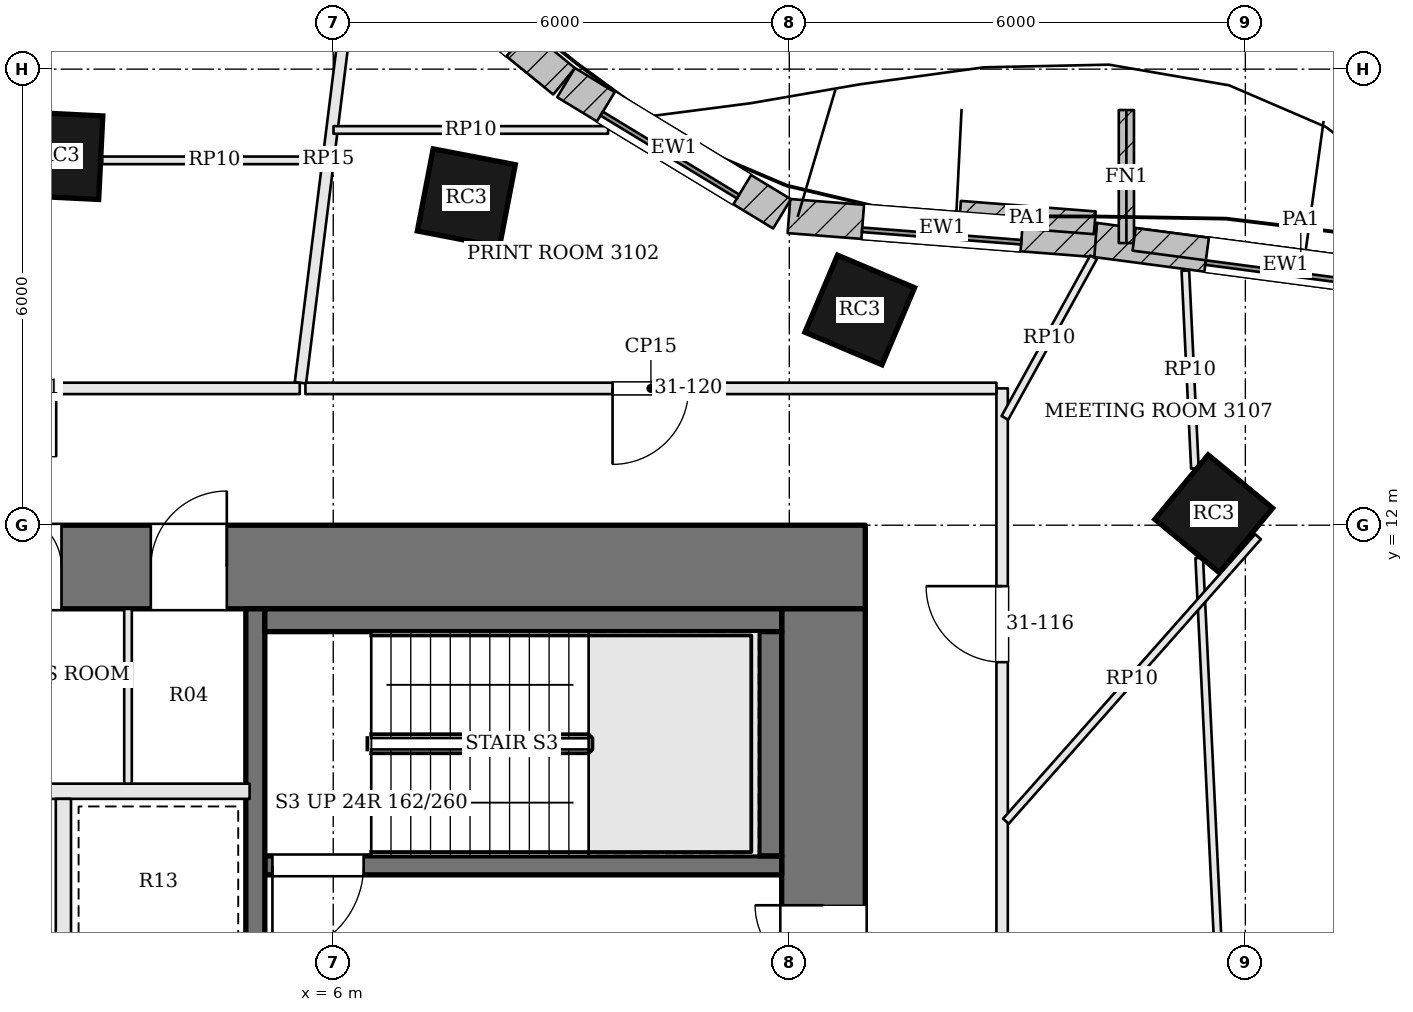
"""IFC4 building model, lengths in metres.
Left out: names, types, materials, properties, quantities, classifications, styles, units other than length and angle.
Written with IfcOpenShell. Run it as: python <this file> out.ifc"""

import sys

from ifc_helpers import new_model, si_unit, direction, frame, frame_2d, origin, origin_2d, place, context, subcontext, project, spatial, rectangle, extrude, element, fill, save


model = new_model("IFC4")
c1 = context("Model", 3, precision=1e-05, world=origin(), true_north=direction((0.0, 1.0)))
c2 = subcontext(c1, "Body", "Model", "MODEL_VIEW")
j1 = project(units=[si_unit("LENGTHUNIT", "METRE"), si_unit("PLANEANGLEUNIT", "RADIAN")], contexts=[c1])
p1 = place(None, origin())
s1 = spatial("IfcSite", under=j1, at=p1, CompositionType="ELEMENT")
p2 = place(p1, origin())
s2 = spatial("IfcBuilding", under=s1, at=p2, CompositionType="ELEMENT")
p3 = place(p2, frame((0.0, 0.0, 130.5)))
s3 = spatial("IfcBuildingStorey", under=s2, at=p3, CompositionType="ELEMENT", Elevation=130.5)
p4 = place(p3, frame((-13.0, 11.45, 0.0), z_axis=(0.0, 0.0, 1.0), x_axis=(1.0, 0.0, 0.0)))
e1 = element("IfcWall", 1, at=p4, inside=s3, PredefinedType="SHEAR", context=c2, shape_type="SweptSolid", body=[
    extrude(rectangle(XDim=26.0, YDim=1.1, at=frame_2d((13.0, 0.0))), origin(), (0.0, 0.0, 1.0), 3.9),
])
p5 = place(p4, frame((9.65, 0.0, 0.0)))
e2 = element("IfcOpeningElement", 2, at=p5, cuts=e1, PredefinedType="OPENING", context=c2, shape_type="SweptSolid", body=[
    extrude(rectangle(XDim=1.0, YDim=2.1, at=frame_2d((0.5, 1.05))), frame((0.0, 0.56, 0.0), z_axis=(0.0, -1.0, 0.0), x_axis=(1.0, 0.0, 0.0)), (0.0, 0.0, 1.0), 1.12),
])
p6 = place(p4, frame((12.675, 0.0, 0.0)))
e3 = element("IfcOpeningElement", 3, at=p6, cuts=e1, PredefinedType="OPENING", context=c2, shape_type="SweptSolid", body=[
    extrude(rectangle(XDim=0.7, YDim=2.1, at=frame_2d((0.35, 1.05))), frame((0.0, 0.56, 0.0), z_axis=(0.0, -1.0, 0.0), x_axis=(1.0, 0.0, 0.0)), (0.0, 0.0, 1.0), 1.12),
])
p7 = place(p4, frame((14.725, 0.0, 0.0)))
e4 = element("IfcOpeningElement", 4, at=p7, cuts=e1, PredefinedType="OPENING", context=c2, shape_type="SweptSolid", body=[
    extrude(rectangle(XDim=0.7, YDim=2.1, at=frame_2d((0.35, 1.05))), frame((0.0, 0.56, 0.0), z_axis=(0.0, -1.0, 0.0), x_axis=(1.0, 0.0, 0.0)), (0.0, 0.0, 1.0), 1.12),
])
p8 = place(p4, frame((16.6, 0.0, 0.0)))
e5 = element("IfcOpeningElement", 5, at=p8, cuts=e1, PredefinedType="OPENING", context=c2, shape_type="SweptSolid", body=[
    extrude(rectangle(XDim=1.0, YDim=2.1, at=frame_2d((0.5, 1.05))), frame((0.0, 0.56, 0.0), z_axis=(0.0, -1.0, 0.0), x_axis=(1.0, 0.0, 0.0)), (0.0, 0.0, 1.0), 1.12),
])
p9 = place(p3, frame((12.45, -1.9, 0.0), z_axis=(0.0, 0.0, 1.0), x_axis=(0.0, 1.0, 0.0)))
e6 = element("IfcWall", 6, at=p9, inside=s3, PredefinedType="SHEAR", context=c2, shape_type="SweptSolid", body=[
    extrude(rectangle(XDim=12.8, YDim=1.1, at=frame_2d((6.4, 0.0))), origin(), (0.0, 0.0, 1.0), 3.9),
])
p10 = place(p9, frame((7.1, 0.0, 0.0)))
e7 = element("IfcOpeningElement", 7, at=p10, cuts=e6, PredefinedType="OPENING", context=c2, shape_type="SweptSolid", body=[
    extrude(rectangle(XDim=1.8, YDim=2.1, at=frame_2d((0.9, 1.05))), frame((0.0, 0.56, 0.0), z_axis=(0.0, -1.0, 0.0), x_axis=(1.0, 0.0, 0.0)), (0.0, 0.0, 1.0), 1.12),
])
for number, where, z_axis, x_axis in (
    (8, (17.584, 12.151, 0.0), (0.0, 0.0, 1.0), (-0.771, 0.637, 0.0)),
    (9, (12.927, 14.832, 0.0), (0.0, 0.0, 1.0), (-0.921, 0.389, 0.0)),
    (10, (7.751, 16.307, 0.0), (0.0, 0.0, 1.0), (-0.982, 0.189, 0.0)),
    (11, (2.392, 16.862, 0.0), (0.0, 0.0, 1.0), (-0.999, 0.049, 0.0)),
):
    element("IfcColumn", number, at=place(p3, frame(where, z_axis=z_axis, x_axis=x_axis)), inside=s3, PredefinedType="COLUMN", context=c2, shape_type="SweptSolid", body=[
        extrude(rectangle(XDim=1.1, YDim=1.1, at=origin_2d()), origin(), (0.0, 0.0, 1.0), 3.9),
    ])
p11 = place(p3, frame((21.044, 15.091, 0.0), z_axis=(0.0, 0.0, 1.0), x_axis=(-0.991409967396, 0.130790965086, 0.0)))
e12 = element("IfcWall", 12, at=p11, inside=s3, PredefinedType="SOLIDWALL", context=c2, shape_type="SweptSolid", body=[
    extrude(rectangle(XDim=5.068, YDim=0.45, at=frame_2d((2.534, 0.0))), origin(), (0.0, 0.0, 1.0), 3.7),
])
p12 = place(p11, frame((1.484, 0.0, 0.9)))
e13 = element("IfcOpeningElement", 13, at=p12, cuts=e12, PredefinedType="OPENING", context=c2, shape_type="SweptSolid", body=[
    extrude(rectangle(XDim=2.1, YDim=2.3, at=frame_2d((1.05, 1.15))), frame((0.0, 0.235, 0.0), z_axis=(0.0, -1.0, 0.0), x_axis=(1.0, 0.0, 0.0)), (0.0, 0.0, 1.0), 0.47),
])
p13 = place(p3, frame((16.03, 15.752, 0.0), z_axis=(0.0, 0.0, 1.0), x_axis=(-0.996967628157, 0.077817404267, 0.0)))
e14 = element("IfcWall", 14, at=p13, inside=s3, PredefinedType="SOLIDWALL", context=c2, shape_type="SweptSolid", body=[
    extrude(rectangle(XDim=4.047, YDim=0.45, at=frame_2d((2.023, 0.0))), origin(), (0.0, 0.0, 1.0), 3.7),
])
p14 = place(p13, frame((0.974, 0.0, 0.9)))
e15 = element("IfcOpeningElement", 15, at=p14, cuts=e14, PredefinedType="OPENING", context=c2, shape_type="SweptSolid", body=[
    extrude(rectangle(XDim=2.1, YDim=2.3, at=frame_2d((1.05, 1.15))), frame((0.0, 0.235, 0.0), z_axis=(0.0, -1.0, 0.0), x_axis=(1.0, 0.0, 0.0)), (0.0, 0.0, 1.0), 0.47),
])
p15 = place(p3, frame((11.905, 16.096, 0.0), z_axis=(0.0, 0.0, 1.0), x_axis=(-0.854609476155, 0.519271261738, 0.0)))
e16 = element("IfcWall", 16, at=p15, inside=s3, PredefinedType="SOLIDWALL", context=c2, shape_type="SweptSolid", body=[
    extrude(rectangle(XDim=3.325, YDim=0.45, at=frame_2d((1.663, 0.0))), origin(), (0.0, 0.0, 1.0), 3.7),
])
p16 = place(p15, frame((0.612, 0.0, 0.9)))
e17 = element("IfcOpeningElement", 17, at=p16, cuts=e16, PredefinedType="OPENING", context=c2, shape_type="SweptSolid", body=[
    extrude(rectangle(XDim=2.1, YDim=2.3, at=frame_2d((1.05, 1.15))), frame((0.0, 0.235, 0.0), z_axis=(0.0, -1.0, 0.0), x_axis=(1.0, 0.0, 0.0)), (0.0, 0.0, 1.0), 0.47),
])
p17 = place(p3, frame((9.037, 17.84, 0.0), z_axis=(0.0, 0.0, 1.0), x_axis=(-0.774810240287, 0.632193871804, 0.0)))
e18 = element("IfcWall", 18, at=p17, inside=s3, PredefinedType="SOLIDWALL", context=c2, shape_type="SweptSolid", body=[
    extrude(rectangle(XDim=3.389, YDim=0.45, at=frame_2d((1.695, 0.0))), origin(), (0.0, 0.0, 1.0), 3.7),
])
p18 = place(p17, frame((0.795, 0.0, 0.9)))
e19 = element("IfcOpeningElement", 19, at=p18, cuts=e18, PredefinedType="OPENING", context=c2, shape_type="SweptSolid", body=[
    extrude(rectangle(XDim=1.8, YDim=2.3, at=frame_2d((0.9, 1.15))), frame((0.0, 0.235, 0.0), z_axis=(0.0, -1.0, 0.0), x_axis=(1.0, 0.0, 0.0)), (0.0, 0.0, 1.0), 0.47),
])
p19 = place(p3, frame((16.435, 15.712, 0.0), z_axis=(0.0, 0.0, 1.0), x_axis=(-0.000279017846, 0.999999961075, 0.0)))
e20 = element("IfcWall", 20, at=p19, inside=s3, PredefinedType="SOLIDWALL", context=c2, shape_type="SweptSolid", body=[
    extrude(rectangle(XDim=1.75, YDim=0.2, at=frame_2d((0.875, 0.0))), origin(), (0.0, 0.0, 1.0), 3.7),
])
p20 = place(p3, frame((20.923, 15.182, 3.9), z_axis=(0.0, 0.0, 1.0), x_axis=(-0.991411041714, 0.130782821377, 0.0)))
e21 = element("IfcWall", 21, at=p20, inside=s3, PredefinedType="PARAPET", context=c2, shape_type="SweptSolid", body=[
    extrude(rectangle(XDim=4.424, YDim=0.3, at=frame_2d((2.212, 0.0))), origin(), (0.0, 0.0, 1.0), 1.1),
])
p21 = place(p3, frame((16.019, 15.979, 3.9), z_axis=(0.0, 0.0, 1.0), x_axis=(-0.99696580474, 0.077840761676, 0.0)))
e22 = element("IfcWall", 22, at=p21, inside=s3, PredefinedType="PARAPET", context=c2, shape_type="SweptSolid", body=[
    extrude(rectangle(XDim=1.778, YDim=0.3, at=frame_2d((0.889, 0.0))), origin(), (0.0, 0.0, 1.0), 1.1),
])
p22 = place(p3, frame((11.9, 7.525, 0.0), z_axis=(0.0, 0.0, 1.0), x_axis=(-1.0, 0.0, 0.0)))
e23 = element("IfcWall", 23, at=p22, inside=s3, PredefinedType="SOLIDWALL", context=c2, shape_type="SweptSolid", body=[
    extrude(rectangle(XDim=6.8, YDim=0.25, at=frame_2d((3.4, 0.0))), origin(), (0.0, 0.0, 1.0), 3.7),
])
p23 = place(p22, frame((5.5, 0.0, 0.0)))
e24 = element("IfcOpeningElement", 24, at=p23, cuts=e23, PredefinedType="OPENING", context=c2, shape_type="SweptSolid", body=[
    extrude(rectangle(XDim=1.2, YDim=2.1, at=frame_2d((0.6, 1.05))), frame((0.0, 0.135, 0.0), z_axis=(0.0, -1.0, 0.0), x_axis=(1.0, 0.0, 0.0)), (0.0, 0.0, 1.0), 0.27),
])
p24 = place(p3, frame((4.975, 10.9, 0.0), z_axis=(0.0, 0.0, 1.0), x_axis=(0.0, -1.0, 0.0)))
e25 = element("IfcWall", 25, at=p24, inside=s3, PredefinedType="SOLIDWALL", context=c2, shape_type="SweptSolid", body=[
    extrude(rectangle(XDim=12.8, YDim=0.25, at=frame_2d((6.4, 0.0))), origin(), (0.0, 0.0, 1.0), 3.7),
])
p25 = place(p24, frame((4.95, 0.0, 0.0)))
e26 = element("IfcOpeningElement", 26, at=p25, cuts=e25, PredefinedType="OPENING", context=c2, shape_type="SweptSolid", body=[
    extrude(rectangle(XDim=1.2, YDim=2.1, at=frame_2d((0.6, 1.05))), frame((0.0, 0.135, 0.0), z_axis=(0.0, -1.0, 0.0), x_axis=(1.0, 0.0, 0.0)), (0.0, 0.0, 1.0), 0.27),
])
p26 = place(p3, frame((11.9, 10.75, 0.0), z_axis=(0.0, 0.0, 1.0), x_axis=(-1.0, 0.0, 0.0)))
e27 = element("IfcWall", 27, at=p26, inside=s3, PredefinedType="SOLIDWALL", context=c2, shape_type="SweptSolid", body=[
    extrude(rectangle(XDim=6.8, YDim=0.3, at=frame_2d((3.4, 0.0))), origin(), (0.0, 0.0, 1.0), 3.7),
])
p27 = place(p3, frame((11.75, 10.6, 0.0), z_axis=(0.0, 0.0, 1.0), x_axis=(0.0, -1.0, 0.0)))
e28 = element("IfcWall", 28, at=p27, inside=s3, PredefinedType="SOLIDWALL", context=c2, shape_type="SweptSolid", body=[
    extrude(rectangle(XDim=2.95, YDim=0.3, at=frame_2d((1.475, 0.0))), origin(), (0.0, 0.0, 1.0), 3.7),
])
p28 = place(p3, frame((-4.9, 8.5, 0.0), z_axis=(0.0, 0.0, 1.0), x_axis=(1.0, 0.0, 0.0)))
e29 = element("IfcWall", 29, at=p28, inside=s3, PredefinedType="SOLIDWALL", context=c2, shape_type="SweptSolid", body=[
    extrude(rectangle(XDim=9.8, YDim=0.2, at=frame_2d((4.9, 0.0))), origin(), (0.0, 0.0, 1.0), 3.7),
])
p29 = place(p3, frame((2.45, 6.2, 0.0), z_axis=(0.0, 0.0, 1.0), x_axis=(0.0, 1.0, 0.0)))
e30 = element("IfcWall", 30, at=p29, inside=s3, PredefinedType="SOLIDWALL", context=c2, shape_type="SweptSolid", body=[
    extrude(rectangle(XDim=2.2, YDim=0.2, at=frame_2d((1.1, 0.0))), origin(), (0.0, 0.0, 1.0), 3.7),
])
p30 = place(p3, frame((3.3, 8.6, 0.0), z_axis=(0.0, 0.0, 1.0), x_axis=(0.0, 1.0, 0.0)))
e31 = element("IfcWall", 31, at=p30, inside=s3, PredefinedType="PARTITIONING", context=c2, shape_type="SweptSolid", body=[
    extrude(rectangle(XDim=2.3, YDim=0.1, at=frame_2d((1.15, 0.0))), origin(), (0.0, 0.0, 1.0), 3.7),
])
p31 = place(p3, frame((5.559, 13.8, 0.0), z_axis=(0.0, 0.0, 1.0), x_axis=(-1.0, 0.0, 0.0)))
e32 = element("IfcWall", 32, at=p31, inside=s3, PredefinedType="PARTITIONING", context=c2, shape_type="SweptSolid", body=[
    extrude(rectangle(XDim=20.359, YDim=0.15, at=frame_2d((10.18, 0.0))), origin(), (0.0, 0.0, 1.0), 3.198),
])
p32 = place(p31, frame((3.204, 0.0, 0.0)))
e33 = element("IfcOpeningElement", 33, at=p32, cuts=e32, PredefinedType="OPENING", context=c2, shape_type="SweptSolid", body=[
    extrude(rectangle(XDim=1.8, YDim=2.1, at=frame_2d((0.9, 1.05))), frame((0.0, 0.085, 0.0), z_axis=(0.0, -1.0, 0.0), x_axis=(1.0, 0.0, 0.0)), (0.0, 0.0, 1.0), 0.17),
])
p33 = place(p31, frame((8.995, 0.0, 0.0)))
e34 = element("IfcOpeningElement", 34, at=p33, cuts=e32, PredefinedType="OPENING", context=c2, shape_type="SweptSolid", body=[
    extrude(rectangle(XDim=1.0, YDim=2.4, at=frame_2d((0.5, 1.2))), frame((0.0, 0.085, 0.0), z_axis=(0.0, -1.0, 0.0), x_axis=(1.0, 0.0, 0.0)), (0.0, 0.0, 1.0), 0.17),
])
p34 = place(p31, frame((13.511, 0.0, 0.0)))
e35 = element("IfcOpeningElement", 35, at=p34, cuts=e32, PredefinedType="OPENING", context=c2, shape_type="SweptSolid", body=[
    extrude(rectangle(XDim=1.0, YDim=2.4, at=frame_2d((0.5, 1.2))), frame((0.0, 0.085, 0.0), z_axis=(0.0, -1.0, 0.0), x_axis=(1.0, 0.0, 0.0)), (0.0, 0.0, 1.0), 0.17),
])
p35 = place(p31, frame((17.45, 0.0, 0.0)))
e36 = element("IfcOpeningElement", 36, at=p35, cuts=e32, PredefinedType="OPENING", context=c2, shape_type="SweptSolid", body=[
    extrude(rectangle(XDim=0.8, YDim=2.1, at=frame_2d((0.4, 1.05))), frame((0.0, 0.085, 0.0), z_axis=(0.0, -1.0, 0.0), x_axis=(1.0, 0.0, 0.0)), (0.0, 0.0, 1.0), 0.17),
])
p36 = place(p3, frame((6.305, 19.774, 0.0), z_axis=(0.0, 0.0, 1.0), x_axis=(-0.12380225648, -0.992306908819, 0.0)))
e37 = element("IfcWall", 37, at=p36, inside=s3, PredefinedType="PARTITIONING", context=c2, shape_type="SweptSolid", body=[
    extrude(rectangle(XDim=5.946, YDim=0.15, at=frame_2d((2.973, 0.0))), origin(), (0.0, 0.0, 1.0), 3.198),
])
p37 = place(p3, frame((14.8, -3.702, 0.0), z_axis=(0.0, 0.0, 1.0), x_axis=(0.0, 1.0, 0.0)))
e38 = element("IfcWall", 38, at=p37, inside=s3, PredefinedType="PARTITIONING", context=c2, shape_type="SweptSolid", body=[
    extrude(rectangle(XDim=17.502, YDim=0.15, at=frame_2d((8.751, 0.0))), origin(), (0.0, 0.0, 1.0), 3.198),
])
p38 = place(p37, frame((4.938, 0.0, 0.0)))
e39 = element("IfcOpeningElement", 39, at=p38, cuts=e38, PredefinedType="OPENING", context=c2, shape_type="SweptSolid", body=[
    extrude(rectangle(XDim=1.8, YDim=2.1, at=frame_2d((0.9, 1.05))), frame((0.0, 0.085, 0.0), z_axis=(0.0, -1.0, 0.0), x_axis=(1.0, 0.0, 0.0)), (0.0, 0.0, 1.0), 0.17),
])
p39 = place(p37, frame((13.9, 0.0, 0.0)))
e40 = element("IfcOpeningElement", 40, at=p39, cuts=e38, PredefinedType="OPENING", context=c2, shape_type="SweptSolid", body=[
    extrude(rectangle(XDim=1.0, YDim=2.4, at=frame_2d((0.5, 1.2))), frame((0.0, 0.085, 0.0), z_axis=(0.0, -1.0, 0.0), x_axis=(1.0, 0.0, 0.0)), (0.0, 0.0, 1.0), 0.17),
])
p40 = place(p3, frame((14.725, 13.8, 0.0), z_axis=(0.0, 0.0, 1.0), x_axis=(-1.0, 0.0, 0.0)))
e41 = element("IfcWall", 41, at=p40, inside=s3, PredefinedType="PARTITIONING", context=c2, shape_type="SweptSolid", body=[
    extrude(rectangle(XDim=9.091, YDim=0.15, at=frame_2d((4.545, 0.0))), origin(), (0.0, 0.0, 1.0), 3.198),
])
p41 = place(p40, frame((4.05, 0.0, 0.0)))
e42 = element("IfcOpeningElement", 42, at=p41, cuts=e41, PredefinedType="OPENING", context=c2, shape_type="SweptSolid", body=[
    extrude(rectangle(XDim=1.0, YDim=2.1, at=frame_2d((0.5, 1.05))), frame((0.0, 0.085, 0.0), z_axis=(0.0, -1.0, 0.0), x_axis=(1.0, 0.0, 0.0)), (0.0, 0.0, 1.0), 0.17),
])
p42 = place(p3, frame((2.96, 16.8, 0.0), z_axis=(0.0, 0.0, 1.0), x_axis=(1.0, 0.0, 0.0)))
e43 = element("IfcWall", 43, at=p42, inside=s3, PredefinedType="PARTITIONING", context=c2, shape_type="SweptSolid", body=[
    extrude(rectangle(XDim=2.954, YDim=0.1, at=frame_2d((1.477, 0.0))), origin(), (0.0, 0.0, 1.0), 3.184),
])
p43 = place(p3, frame((6.004, 17.2, 0.0), z_axis=(0.0, 0.0, 1.0), x_axis=(1.0, 0.0, 0.0)))
e44 = element("IfcWall", 44, at=p43, inside=s3, PredefinedType="PARTITIONING", context=c2, shape_type="SweptSolid", body=[
    extrude(rectangle(XDim=3.613, YDim=0.1, at=frame_2d((1.806, 0.0))), origin(), (0.0, 0.0, 1.0), 3.184),
])
p44 = place(p3, frame((17.211, 15.349, 0.0), z_axis=(0.0, 0.0, 1.0), x_axis=(0.048152668687, -0.998839987435, 0.0)))
e45 = element("IfcWall", 45, at=p44, inside=s3, PredefinedType="PARTITIONING", context=c2, shape_type="SweptSolid", body=[
    extrude(rectangle(XDim=2.606, YDim=0.1, at=frame_2d((1.303, 0.0))), origin(), (0.0, 0.0, 1.0), 3.184),
])
p45 = place(p3, frame((17.393, 11.569, 0.0), z_axis=(0.0, 0.0, 1.0), x_axis=(0.048202645711, -0.998837576859, 0.0)))
e46 = element("IfcWall", 46, at=p45, inside=s3, PredefinedType="PARTITIONING", context=c2, shape_type="SweptSolid", body=[
    extrude(rectangle(XDim=16.74, YDim=0.1, at=frame_2d((8.37, 0.0))), origin(), (0.0, 0.0, 1.0), 3.184),
])
p46 = place(p45, frame((9.311, 0.0, 0.0)))
e47 = element("IfcOpeningElement", 47, at=p46, cuts=e46, PredefinedType="OPENING", context=c2, shape_type="SweptSolid", body=[
    extrude(rectangle(XDim=1.0, YDim=2.1, at=frame_2d((0.5, 1.05))), frame((0.0, 0.06, 0.0), z_axis=(0.0, -1.0, 0.0), x_axis=(1.0, 0.0, 0.0)), (0.0, 0.0, 1.0), 0.12),
])
p47 = place(p3, frame((14.85, 8.106, 0.0), z_axis=(0.0, 0.0, 1.0), x_axis=(0.663305650233, 0.748348591479, 0.0)))
e48 = element("IfcWall", 48, at=p47, inside=s3, PredefinedType="PARTITIONING", context=c2, shape_type="SweptSolid", body=[
    extrude(rectangle(XDim=5.001, YDim=0.1, at=frame_2d((2.5, 0.0))), origin(), (0.0, 0.0, 1.0), 3.184),
])
p48 = place(p3, frame((14.836, 13.412, 0.0), z_axis=(0.0, 0.0, 1.0), x_axis=(0.483304666726, 0.875452225493, 0.0)))
e49 = element("IfcWall", 49, at=p48, inside=s3, PredefinedType="PARTITIONING", context=c2, shape_type="SweptSolid", body=[
    extrude(rectangle(XDim=2.413, YDim=0.1, at=frame_2d((1.207, 0.0))), origin(), (0.0, 0.0, 1.0), 3.184),
])
p49 = place(p12, origin())
e50 = element("IfcWindow", 50, at=p49, inside=s3, PartitioningType="SINGLE_PANEL", PredefinedType="WINDOW", context=c2, shape_type="SweptSolid", body=[
    extrude(rectangle(XDim=2.1, YDim=2.3, at=frame_2d((1.05, 1.15))), frame((0.0, 0.135, 0.0), z_axis=(0.0, -1.0, 0.0), x_axis=(1.0, 0.0, 0.0)), (0.0, 0.0, 1.0), 0.06),
])
fill(e13, e50)
p50 = place(p14, origin())
e51 = element("IfcWindow", 51, at=p50, inside=s3, PartitioningType="SINGLE_PANEL", PredefinedType="WINDOW", context=c2, shape_type="SweptSolid", body=[
    extrude(rectangle(XDim=2.1, YDim=2.3, at=frame_2d((1.05, 1.15))), frame((0.0, 0.135, 0.0), z_axis=(0.0, -1.0, 0.0), x_axis=(1.0, 0.0, 0.0)), (0.0, 0.0, 1.0), 0.06),
])
fill(e15, e51)
p51 = place(p16, origin())
e52 = element("IfcWindow", 52, at=p51, inside=s3, PartitioningType="SINGLE_PANEL", PredefinedType="WINDOW", context=c2, shape_type="SweptSolid", body=[
    extrude(rectangle(XDim=2.1, YDim=2.3, at=frame_2d((1.05, 1.15))), frame((0.0, 0.135, 0.0), z_axis=(0.0, -1.0, 0.0), x_axis=(1.0, 0.0, 0.0)), (0.0, 0.0, 1.0), 0.06),
])
fill(e17, e52)
p52 = place(p10, origin())
e53 = element("IfcDoor", 53, at=p52, inside=s3, OperationType="DOUBLE_DOOR_SINGLE_SWING", PredefinedType="DOOR", context=c2, shape_type="SweptSolid", body=[
    extrude(rectangle(XDim=1.8, YDim=2.1, at=frame_2d((0.9, 1.05))), frame((0.0, 0.025, 0.0), z_axis=(0.0, -1.0, 0.0), x_axis=(1.0, 0.0, 0.0)), (0.0, 0.0, 1.0), 0.05),
])
fill(e7, e53)
p53 = place(p23, origin())
e54 = element("IfcDoor", 54, at=p53, inside=s3, OperationType="SINGLE_SWING_RIGHT", PredefinedType="DOOR", context=c2, shape_type="SweptSolid", body=[
    extrude(rectangle(XDim=1.2, YDim=2.1, at=frame_2d((0.6, 1.05))), frame((0.0, 0.025, 0.0), z_axis=(0.0, -1.0, 0.0), x_axis=(1.0, 0.0, 0.0)), (0.0, 0.0, 1.0), 0.05),
])
fill(e24, e54)
p54 = place(p7, origin())
e55 = element("IfcDoor", 55, at=p54, inside=s3, OperationType="SINGLE_SWING_LEFT", PredefinedType="DOOR", context=c2, shape_type="SweptSolid", body=[
    extrude(rectangle(XDim=0.7, YDim=2.1, at=frame_2d((0.35, 1.05))), frame((0.0, 0.025, 0.0), z_axis=(0.0, -1.0, 0.0), x_axis=(1.0, 0.0, 0.0)), (0.0, 0.0, 1.0), 0.05),
])
fill(e4, e55)
p55 = place(p8, origin())
e56 = element("IfcDoor", 56, at=p55, inside=s3, OperationType="SINGLE_SWING_RIGHT", PredefinedType="DOOR", context=c2, shape_type="SweptSolid", body=[
    extrude(rectangle(XDim=1.0, YDim=2.1, at=frame_2d((0.5, 1.05))), frame((0.0, 0.025, 0.0), z_axis=(0.0, -1.0, 0.0), x_axis=(1.0, 0.0, 0.0)), (0.0, 0.0, 1.0), 0.05),
])
fill(e5, e56)
p56 = place(p32, origin())
e57 = element("IfcDoor", 57, at=p56, inside=s3, OperationType="DOUBLE_DOOR_SINGLE_SWING", PredefinedType="DOOR", context=c2, shape_type="SweptSolid", body=[
    extrude(rectangle(XDim=1.8, YDim=2.1, at=frame_2d((0.9, 1.05))), frame((0.0, 0.025, 0.0), z_axis=(0.0, -1.0, 0.0), x_axis=(1.0, 0.0, 0.0)), (0.0, 0.0, 1.0), 0.05),
])
fill(e33, e57)
p57 = place(p39, origin())
e58 = element("IfcDoor", 58, at=p57, inside=s3, OperationType="SINGLE_SWING_RIGHT", PredefinedType="DOOR", context=c2, shape_type="SweptSolid", body=[
    extrude(rectangle(XDim=1.0, YDim=2.4, at=frame_2d((0.5, 1.2))), frame((0.0, 0.025, 0.0), z_axis=(0.0, -1.0, 0.0), x_axis=(1.0, 0.0, 0.0)), (0.0, 0.0, 1.0), 0.05),
])
fill(e40, e58)
p58 = place(p41, origin())
e59 = element("IfcDoor", 59, at=p58, inside=s3, OperationType="SINGLE_SWING_RIGHT", PredefinedType="DOOR", context=c2, shape_type="SweptSolid", body=[
    extrude(rectangle(XDim=1.0, YDim=2.1, at=frame_2d((0.5, 1.05))), frame((0.0, 0.025, 0.0), z_axis=(0.0, -1.0, 0.0), x_axis=(1.0, 0.0, 0.0)), (0.0, 0.0, 1.0), 0.05),
])
fill(e42, e59)
save(model, sys.argv[1])
